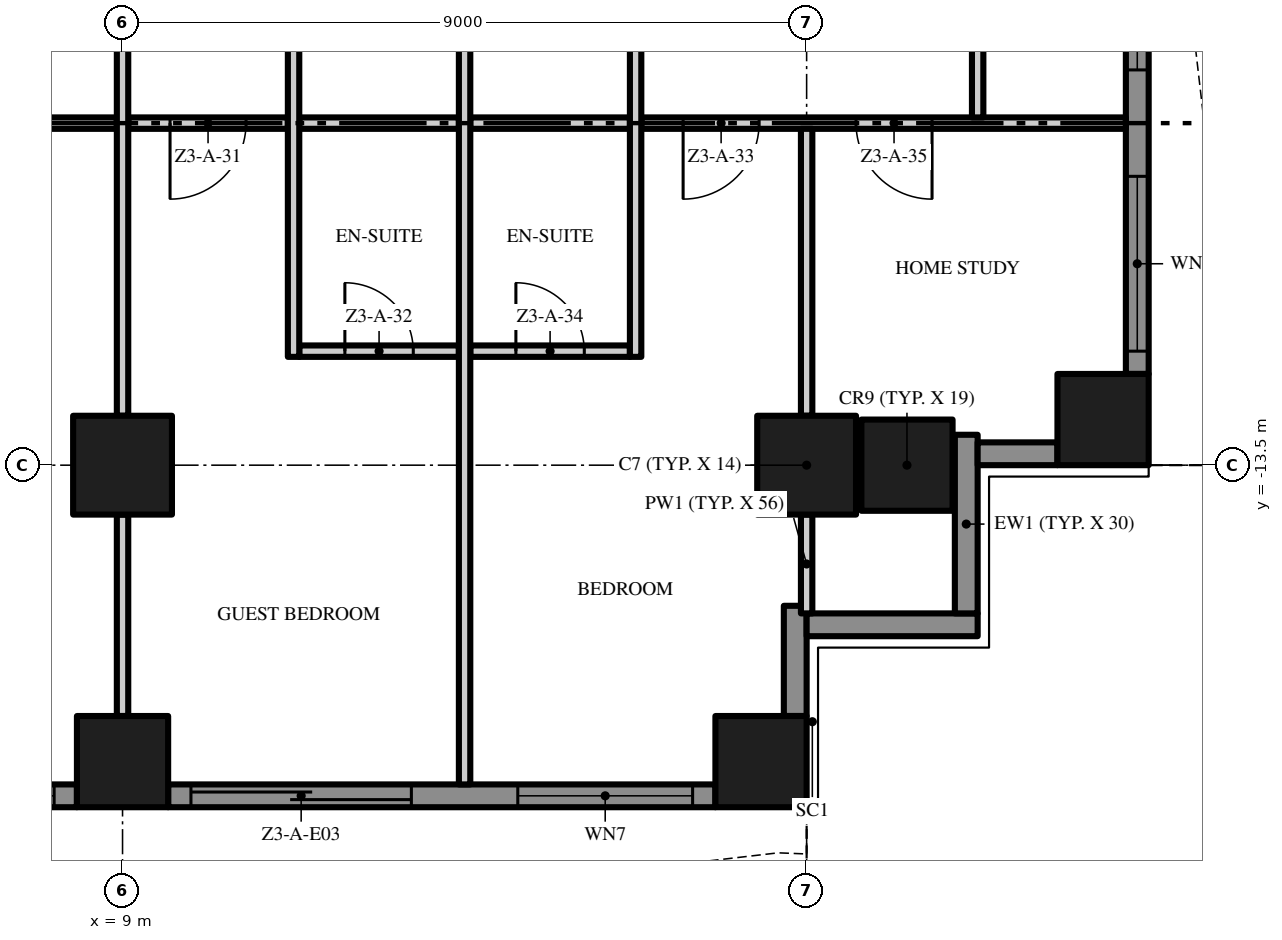
"""IFC4 building model, lengths in metres.
Left out: names, types, materials, properties, quantities, classifications, styles, units other than length and angle.
Written with IfcOpenShell. Run it as: python <this file> out.ifc"""

import sys

from ifc_helpers import new_model, si_unit, direction, frame, frame_2d, origin, origin_2d, place, context, subcontext, project, spatial, polyline, rectangle, outline, extrude, element, fill, save


model = new_model("IFC4")
c1 = context("Model", 3, precision=1e-05, world=origin(), true_north=direction((0.0, 1.0)))
c2 = subcontext(c1, "Body", "Model", "MODEL_VIEW")
j1 = project(units=[si_unit("LENGTHUNIT", "METRE"), si_unit("PLANEANGLEUNIT", "RADIAN")], contexts=[c1])
p1 = place(None, origin())
s1 = spatial("IfcSite", under=j1, at=p1, CompositionType="ELEMENT")
p2 = place(p1, origin())
s2 = spatial("IfcBuilding", under=s1, at=p2, CompositionType="ELEMENT")
p3 = place(p2, frame((0.0, 0.0, 125.0)))
s3 = spatial("IfcBuildingStorey", under=s2, at=p3, CompositionType="ELEMENT", Elevation=125.0)
p4 = place(p3, frame((18.0, -13.5, 0.0), z_axis=(0.0, 0.0, 1.0), x_axis=(1.0, 0.0, 0.0)))
e1 = element("IfcColumn", 1, at=p4, inside=s3, PredefinedType="COLUMN", context=c2, shape_type="SweptSolid", body=[
    extrude(rectangle(XDim=1.3, YDim=1.3, at=origin_2d()), origin(), (0.0, 0.0, 1.0), 3.5),
])
for number, where, z_axis, x_axis in (
    (2, (17.4, -17.4, 0.0), (0.0, 0.0, 1.0), (1.0, 0.0, 0.0)),
    (3, (21.9, -12.9, 0.0), (0.0, 0.0, 1.0), (1.0, 0.0, 0.0)),
    (4, (19.32, -13.5, 0.0), (0.0, 0.0, 1.0), (1.0, 0.0, 0.0)),
):
    element("IfcColumn", number, at=place(p3, frame(where, z_axis=z_axis, x_axis=x_axis)), inside=s3, PredefinedType="COLUMN", context=c2, shape_type="SweptSolid", body=[
        extrude(rectangle(XDim=1.2, YDim=1.2, at=origin_2d()), origin(), (0.0, 0.0, 1.0), 3.5),
    ])
p5 = place(p3, frame((9.0, -13.5, 0.0), z_axis=(0.0, 0.0, 1.0), x_axis=(1.0, 0.0, 0.0)))
e5 = element("IfcColumn", 5, at=p5, inside=s3, PredefinedType="COLUMN", context=c2, shape_type="SweptSolid", body=[
    extrude(rectangle(XDim=1.3, YDim=1.3, at=origin_2d()), origin(), (0.0, 0.0, 1.0), 3.5),
])
p6 = place(p3, frame((9.0, -17.4, 0.0), z_axis=(0.0, 0.0, 1.0), x_axis=(1.0, 0.0, 0.0)))
e6 = element("IfcColumn", 6, at=p6, inside=s3, PredefinedType="COLUMN", context=c2, shape_type="SweptSolid", body=[
    extrude(rectangle(XDim=1.2, YDim=1.2, at=origin_2d()), origin(), (0.0, 0.0, 1.0), 3.5),
])
p7 = place(p3, frame((8.4, -17.85, 0.0), z_axis=(0.0, 0.0, 1.0), x_axis=(-1.0, 0.0, 0.0)))
e7 = element("IfcWall", 7, at=p7, inside=s3, PredefinedType="SOLIDWALL", context=c2, shape_type="SweptSolid", body=[
    extrude(rectangle(XDim=7.8, YDim=0.3, at=frame_2d((3.9, 0.0))), origin(), (0.0, 0.0, 1.0), 3.5),
])
p8 = place(p7, frame((4.6, 0.0, 0.45)))
e8 = element("IfcOpeningElement", 8, at=p8, cuts=e7, PredefinedType="OPENING", context=c2, shape_type="SweptSolid", body=[
    extrude(rectangle(XDim=2.9, YDim=2.65, at=frame_2d((1.45, 1.325))), frame((0.0, 0.16, 0.0), z_axis=(0.0, -1.0, 0.0), x_axis=(1.0, 0.0, 0.0)), (0.0, 0.0, 1.0), 0.32),
])
p9 = place(p7, frame((0.3, 0.0, 0.45)))
e9 = element("IfcOpeningElement", 9, at=p9, cuts=e7, PredefinedType="OPENING", context=c2, shape_type="SweptSolid", body=[
    extrude(rectangle(XDim=2.9, YDim=2.65, at=frame_2d((1.45, 1.325))), frame((0.0, 0.16, 0.0), z_axis=(0.0, -1.0, 0.0), x_axis=(1.0, 0.0, 0.0)), (0.0, 0.0, 1.0), 0.32),
])
p10 = place(p3, frame((16.8, -17.85, 0.0), z_axis=(0.0, 0.0, 1.0), x_axis=(-1.0, 0.0, 0.0)))
e10 = element("IfcWall", 10, at=p10, inside=s3, PredefinedType="SOLIDWALL", context=c2, shape_type="SweptSolid", body=[
    extrude(rectangle(XDim=7.2, YDim=0.3, at=frame_2d((3.6, 0.0))), origin(), (0.0, 0.0, 1.0), 3.5),
])
p11 = place(p10, frame((4.0, 0.0, 0.0)))
e11 = element("IfcOpeningElement", 11, at=p11, cuts=e10, PredefinedType="OPENING", context=c2, shape_type="SweptSolid", body=[
    extrude(rectangle(XDim=2.9, YDim=2.4, at=frame_2d((1.45, 1.2))), frame((0.0, 0.16, 0.0), z_axis=(0.0, -1.0, 0.0), x_axis=(1.0, 0.0, 0.0)), (0.0, 0.0, 1.0), 0.32),
])
p12 = place(p10, frame((0.3, 0.0, 0.45)))
e12 = element("IfcOpeningElement", 12, at=p12, cuts=e10, PredefinedType="OPENING", context=c2, shape_type="SweptSolid", body=[
    extrude(rectangle(XDim=2.3, YDim=2.65, at=frame_2d((1.15, 1.325))), frame((0.0, 0.16, 0.0), z_axis=(0.0, -1.0, 0.0), x_axis=(1.0, 0.0, 0.0)), (0.0, 0.0, 1.0), 0.32),
])
p13 = place(p3, frame((17.85, -15.35, 0.0), z_axis=(0.0, 0.0, 1.0), x_axis=(0.0, -1.0, 0.0)))
e13 = element("IfcWall", 13, at=p13, inside=s3, PredefinedType="SOLIDWALL", context=c2, shape_type="SweptSolid", body=[
    extrude(rectangle(XDim=1.45, YDim=0.3, at=frame_2d((0.725, 0.0))), origin(), (0.0, 0.0, 1.0), 3.5),
])
p14 = place(p3, frame((20.25, -15.6, 0.0), z_axis=(0.0, 0.0, 1.0), x_axis=(-1.0, 0.0, 0.0)))
e14 = element("IfcWall", 14, at=p14, inside=s3, PredefinedType="SOLIDWALL", context=c2, shape_type="SweptSolid", body=[
    extrude(rectangle(XDim=2.25, YDim=0.3, at=frame_2d((1.125, 0.0))), origin(), (0.0, 0.0, 1.0), 3.5),
])
p15 = place(p3, frame((20.1, -13.1, 0.0), z_axis=(0.0, 0.0, 1.0), x_axis=(0.0, -1.0, 0.0)))
e15 = element("IfcWall", 15, at=p15, inside=s3, PredefinedType="SOLIDWALL", context=c2, shape_type="SweptSolid", body=[
    extrude(rectangle(XDim=2.35, YDim=0.3, at=frame_2d((1.175, 0.0))), origin(), (0.0, 0.0, 1.0), 3.5),
])
p16 = place(p3, frame((21.3, -13.35, 0.0), z_axis=(0.0, 0.0, 1.0), x_axis=(-1.0, 0.0, 0.0)))
e16 = element("IfcWall", 16, at=p16, inside=s3, PredefinedType="SOLIDWALL", context=c2, shape_type="SweptSolid", body=[
    extrude(rectangle(XDim=1.05, YDim=0.3, at=frame_2d((0.525, 0.0))), origin(), (0.0, 0.0, 1.0), 3.5),
])
p17 = place(p3, frame((22.35, -5.1, 0.0), z_axis=(0.0, 0.0, 1.0), x_axis=(0.0, -1.0, 0.0)))
e17 = element("IfcWall", 17, at=p17, inside=s3, PredefinedType="SOLIDWALL", context=c2, shape_type="SweptSolid", body=[
    extrude(rectangle(XDim=7.2, YDim=0.3, at=frame_2d((3.6, 0.0))), origin(), (0.0, 0.0, 1.0), 3.5),
])
p18 = place(p17, frame((4.6, 0.0, 0.45)))
e18 = element("IfcOpeningElement", 18, at=p18, cuts=e17, PredefinedType="OPENING", context=c2, shape_type="SweptSolid", body=[
    extrude(rectangle(XDim=2.3, YDim=2.65, at=frame_2d((1.15, 1.325))), frame((0.0, 0.16, 0.0), z_axis=(0.0, -1.0, 0.0), x_axis=(1.0, 0.0, 0.0)), (0.0, 0.0, 1.0), 0.32),
])
p19 = place(p17, frame((0.3, 0.0, 0.45)))
e19 = element("IfcOpeningElement", 19, at=p19, cuts=e17, PredefinedType="OPENING", context=c2, shape_type="SweptSolid", body=[
    extrude(rectangle(XDim=2.9, YDim=2.65, at=frame_2d((1.45, 1.325))), frame((0.0, 0.16, 0.0), z_axis=(0.0, -1.0, 0.0), x_axis=(1.0, 0.0, 0.0)), (0.0, 0.0, 1.0), 0.32),
])
p20 = place(p3, origin())
e20 = element("IfcWall", 20, at=p20, inside=s3, PredefinedType="USERDEFINED", context=c2, shape_type="SweptSolid", body=[
    extrude(outline(polyline([(-18.0, -20.649), (-16.5, -19.988), (-15.0, -19.255), (-13.5, -18.731), (-12.375, -18.6), (-12.0, -18.615), (-10.5, -18.951), (-9.0, -19.612), (-7.5, -20.345), (-6.0, -20.869), (-4.875, -21.0), (-4.5, -20.985), (-3.0, -20.649), (-1.5, -19.988), (0.0, -19.255), (1.5, -18.731), (2.625, -18.6), (3.0, -18.615), (4.5, -18.951), (6.0, -19.612), (7.5, -20.345), (9.0, -20.869), (10.125, -21.0), (10.5, -20.985), (12.0, -20.649), (13.5, -19.988), (15.0, -19.255), (16.5, -18.731), (17.625, -18.6), (18.0, -18.615), (18.01, -18.365), (17.615, -18.349), (16.444, -18.486), (14.904, -19.024), (13.395, -19.761), (11.921, -20.41), (10.467, -20.736), (10.135, -20.749), (9.056, -20.624), (7.596, -20.114), (6.105, -19.385), (4.579, -18.713), (3.033, -18.366), (2.615, -18.349), (1.444, -18.486), (-0.096, -19.024), (-1.605, -19.761), (-3.079, -20.41), (-4.533, -20.736), (-4.865, -20.749), (-5.944, -20.624), (-7.404, -20.114), (-8.895, -19.385), (-10.421, -18.713), (-11.967, -18.366), (-12.385, -18.349), (-13.556, -18.486), (-15.096, -19.024), (-16.605, -19.761), (-18.101, -20.42), (-18.0, -20.649)])), origin(), (0.0, 0.0, 1.0), 0.9),
])
p21 = place(p3, origin())
e21 = element("IfcWall", 21, at=p21, inside=s3, PredefinedType="USERDEFINED", context=c2, shape_type="SweptSolid", body=[
    extrude(outline(polyline([(25.149, -13.5), (24.488, -12.0), (23.755, -10.5), (23.231, -9.0), (23.1, -7.875), (23.115, -7.5), (23.451, -6.0), (24.112, -4.5), (24.845, -3.0), (25.369, -1.5), (25.5, -0.375), (25.485, 0.0), (25.149, 1.5), (24.488, 3.0), (23.755, 4.5), (23.231, 6.0), (23.1, 7.125), (23.115, 7.5), (23.451, 9.0), (24.112, 10.5), (24.845, 12.0), (25.369, 13.5), (25.5, 14.625), (25.485, 15.0), (25.149, 16.5), (24.488, 18.0), (24.259, 17.899), (24.91, 16.421), (25.236, 14.967), (25.249, 14.635), (25.124, 13.556), (24.614, 12.096), (23.885, 10.605), (23.213, 9.079), (22.866, 7.533), (22.849, 7.115), (22.986, 5.944), (23.524, 4.404), (24.261, 2.895), (24.91, 1.421), (25.236, -0.033), (25.249, -0.365), (25.124, -1.444), (24.614, -2.904), (23.885, -4.395), (23.213, -5.921), (22.866, -7.467), (22.849, -7.885), (22.986, -9.056), (23.524, -10.596), (24.261, -12.105), (24.92, -13.601), (25.149, -13.5)])), origin(), (0.0, 0.0, 1.0), 0.9),
])
p22 = place(p3, frame((11.325, -12.0, 0.0), z_axis=(0.0, 0.0, 1.0), x_axis=(1.0, 0.0, 0.0)))
e22 = element("IfcWall", 22, at=p22, inside=s3, PredefinedType="PARTITIONING", context=c2, shape_type="SweptSolid", body=[
    extrude(rectangle(XDim=2.1, YDim=0.15, at=frame_2d((1.05, 0.0))), origin(), (0.0, 0.0, 1.0), 3.5),
])
p23 = place(p22, frame((0.6, 0.0, 0.0)))
e23 = element("IfcOpeningElement", 23, at=p23, cuts=e22, PredefinedType="OPENING", context=c2, shape_type="SweptSolid", body=[
    extrude(rectangle(XDim=0.9, YDim=2.1, at=frame_2d((0.45, 1.05))), frame((0.0, 0.085, 0.0), z_axis=(0.0, -1.0, 0.0), x_axis=(1.0, 0.0, 0.0)), (0.0, 0.0, 1.0), 0.17),
])
p24 = place(p3, frame((13.575, -12.0, 0.0), z_axis=(0.0, 0.0, 1.0), x_axis=(1.0, 0.0, 0.0)))
e24 = element("IfcWall", 24, at=p24, inside=s3, PredefinedType="PARTITIONING", context=c2, shape_type="SweptSolid", body=[
    extrude(rectangle(XDim=2.1, YDim=0.15, at=frame_2d((1.05, 0.0))), origin(), (0.0, 0.0, 1.0), 3.5),
])
p25 = place(p24, frame((0.6, 0.0, 0.0)))
e25 = element("IfcOpeningElement", 25, at=p25, cuts=e24, PredefinedType="OPENING", context=c2, shape_type="SweptSolid", body=[
    extrude(rectangle(XDim=0.9, YDim=2.1, at=frame_2d((0.45, 1.05))), frame((0.0, 0.085, 0.0), z_axis=(0.0, -1.0, 0.0), x_axis=(1.0, 0.0, 0.0)), (0.0, 0.0, 1.0), 0.17),
])
p26 = place(p3, frame((8.925, -9.0, 0.0), z_axis=(0.0, 0.0, 1.0), x_axis=(-1.0, 0.0, 0.0)))
e26 = element("IfcWall", 26, at=p26, inside=s3, PredefinedType="PARTITIONING", context=c2, shape_type="SweptSolid", body=[
    extrude(rectangle(XDim=8.85, YDim=0.15, at=frame_2d((4.425, 0.0))), origin(), (0.0, 0.0, 1.0), 3.5),
])
p27 = place(p26, frame((6.3, 0.0, 0.0)))
e27 = element("IfcOpeningElement", 27, at=p27, cuts=e26, PredefinedType="OPENING", context=c2, shape_type="SweptSolid", body=[
    extrude(rectangle(XDim=1.5, YDim=2.4, at=frame_2d((0.75, 1.2))), frame((0.0, 0.085, 0.0), z_axis=(0.0, -1.0, 0.0), x_axis=(1.0, 0.0, 0.0)), (0.0, 0.0, 1.0), 0.17),
])
p28 = place(p3, frame((11.175, -9.0, 0.0), z_axis=(0.0, 0.0, 1.0), x_axis=(-1.0, 0.0, 0.0)))
e28 = element("IfcWall", 28, at=p28, inside=s3, PredefinedType="PARTITIONING", context=c2, shape_type="SweptSolid", body=[
    extrude(rectangle(XDim=2.1, YDim=0.15, at=frame_2d((1.05, 0.0))), origin(), (0.0, 0.0, 1.0), 3.5),
])
p29 = place(p28, frame((0.55, 0.0, 0.0)))
e29 = element("IfcOpeningElement", 29, at=p29, cuts=e28, PredefinedType="OPENING", context=c2, shape_type="SweptSolid", body=[
    extrude(rectangle(XDim=1.0, YDim=2.4, at=frame_2d((0.5, 1.2))), frame((0.0, 0.085, 0.0), z_axis=(0.0, -1.0, 0.0), x_axis=(1.0, 0.0, 0.0)), (0.0, 0.0, 1.0), 0.17),
])
for number, where, z_axis, x_axis in (
    (30, (11.325, -9.0, 0.0), (0.0, 0.0, 1.0), (1.0, 0.0, 0.0)),
    (31, (13.575, -9.0, 0.0), (0.0, 0.0, 1.0), (1.0, 0.0, 0.0)),
):
    element("IfcWall", number, at=place(p3, frame(where, z_axis=z_axis, x_axis=x_axis)), inside=s3, PredefinedType="PARTITIONING", context=c2, shape_type="SweptSolid", body=[
        extrude(rectangle(XDim=2.1, YDim=0.15, at=frame_2d((1.05, 0.0))), origin(), (0.0, 0.0, 1.0), 3.5),
    ])
p30 = place(p3, frame((22.2, -9.0, 0.0), z_axis=(0.0, 0.0, 1.0), x_axis=(-1.0, 0.0, 0.0)))
e32 = element("IfcWall", 32, at=p30, inside=s3, PredefinedType="PARTITIONING", context=c2, shape_type="SweptSolid", body=[
    extrude(rectangle(XDim=6.375, YDim=0.15, at=frame_2d((3.188, 0.0))), origin(), (0.0, 0.0, 1.0), 3.5),
])
p31 = place(p30, frame((4.825, 0.0, 0.0)))
e33 = element("IfcOpeningElement", 33, at=p31, cuts=e32, PredefinedType="OPENING", context=c2, shape_type="SweptSolid", body=[
    extrude(rectangle(XDim=1.0, YDim=2.4, at=frame_2d((0.5, 1.2))), frame((0.0, 0.085, 0.0), z_axis=(0.0, -1.0, 0.0), x_axis=(1.0, 0.0, 0.0)), (0.0, 0.0, 1.0), 0.17),
])
p32 = place(p30, frame((2.55, 0.0, 0.0)))
e34 = element("IfcOpeningElement", 34, at=p32, cuts=e32, PredefinedType="OPENING", context=c2, shape_type="SweptSolid", body=[
    extrude(rectangle(XDim=1.0, YDim=2.4, at=frame_2d((0.5, 1.2))), frame((0.0, 0.085, 0.0), z_axis=(0.0, -1.0, 0.0), x_axis=(1.0, 0.0, 0.0)), (0.0, 0.0, 1.0), 0.17),
])
p33 = place(p3, frame((9.0, -16.8, 0.0), z_axis=(0.0, 0.0, 1.0), x_axis=(0.0, 1.0, 0.0)))
e35 = element("IfcWall", 35, at=p33, inside=s3, PredefinedType="PARTITIONING", context=c2, shape_type="SweptSolid", body=[
    extrude(rectangle(XDim=2.65, YDim=0.15, at=frame_2d((1.325, 0.0))), origin(), (0.0, 0.0, 1.0), 3.5),
])
p34 = place(p3, frame((9.0, -12.85, 0.0), z_axis=(0.0, 0.0, 1.0), x_axis=(0.0, 1.0, 0.0)))
e36 = element("IfcWall", 36, at=p34, inside=s3, PredefinedType="PARTITIONING", context=c2, shape_type="SweptSolid", body=[
    extrude(rectangle(XDim=7.7, YDim=0.15, at=frame_2d((3.85, 0.0))), origin(), (0.0, 0.0, 1.0), 3.5),
])
p35 = place(p3, frame((11.25, -12.075, 0.0), z_axis=(0.0, 0.0, 1.0), x_axis=(0.0, 1.0, 0.0)))
e37 = element("IfcWall", 37, at=p35, inside=s3, PredefinedType="PARTITIONING", context=c2, shape_type="SweptSolid", body=[
    extrude(rectangle(XDim=7.65, YDim=0.15, at=frame_2d((3.825, 0.0))), origin(), (0.0, 0.0, 1.0), 3.5),
])
p36 = place(p3, frame((13.5, -17.7, 0.0), z_axis=(0.0, 0.0, 1.0), x_axis=(0.0, 1.0, 0.0)))
e38 = element("IfcWall", 38, at=p36, inside=s3, PredefinedType="PARTITIONING", context=c2, shape_type="SweptSolid", body=[
    extrude(rectangle(XDim=13.125, YDim=0.15, at=frame_2d((6.562, 0.0))), origin(), (0.0, 0.0, 1.0), 3.5),
])
p37 = place(p3, frame((15.75, -12.075, 0.0), z_axis=(0.0, 0.0, 1.0), x_axis=(0.0, 1.0, 0.0)))
e39 = element("IfcWall", 39, at=p37, inside=s3, PredefinedType="PARTITIONING", context=c2, shape_type="SweptSolid", body=[
    extrude(rectangle(XDim=7.65, YDim=0.15, at=frame_2d((3.825, 0.0))), origin(), (0.0, 0.0, 1.0), 3.5),
])
p38 = place(p3, frame((18.0, -15.45, 0.0), z_axis=(0.0, 0.0, 1.0), x_axis=(0.0, 1.0, 0.0)))
e40 = element("IfcWall", 40, at=p38, inside=s3, PredefinedType="PARTITIONING", context=c2, shape_type="SweptSolid", body=[
    extrude(rectangle(XDim=1.3, YDim=0.15, at=frame_2d((0.65, 0.0))), origin(), (0.0, 0.0, 1.0), 3.5),
])
p39 = place(p3, frame((18.0, -12.85, 0.0), z_axis=(0.0, 0.0, 1.0), x_axis=(0.0, 1.0, 0.0)))
e41 = element("IfcWall", 41, at=p39, inside=s3, PredefinedType="PARTITIONING", context=c2, shape_type="SweptSolid", body=[
    extrude(rectangle(XDim=3.775, YDim=0.15, at=frame_2d((1.887, 0.0))), origin(), (0.0, 0.0, 1.0), 3.5),
])
p40 = place(p3, frame((20.25, -4.425, 0.0), z_axis=(0.0, 0.0, 1.0), x_axis=(0.0, -1.0, 0.0)))
e42 = element("IfcWall", 42, at=p40, inside=s3, PredefinedType="PARTITIONING", context=c2, shape_type="SweptSolid", body=[
    extrude(rectangle(XDim=4.5, YDim=0.15, at=frame_2d((2.25, 0.0))), origin(), (0.0, 0.0, 1.0), 3.5),
])
p41 = place(p40, frame((1.95, 0.0, 0.0)))
e43 = element("IfcOpeningElement", 43, at=p41, cuts=e42, PredefinedType="OPENING", context=c2, shape_type="SweptSolid", body=[
    extrude(rectangle(XDim=0.8, YDim=2.0, at=frame_2d((0.4, 1.0))), frame((0.0, 0.085, 0.0), z_axis=(0.0, -1.0, 0.0), x_axis=(1.0, 0.0, 0.0)), (0.0, 0.0, 1.0), 0.17),
])
p42 = place(p9, origin())
e44 = element("IfcWindow", 44, at=p42, inside=s3, PartitioningType="SINGLE_PANEL", PredefinedType="WINDOW", context=c2, shape_type="SweptSolid", body=[
    extrude(rectangle(XDim=2.9, YDim=2.65, at=frame_2d((1.45, 1.325))), frame((0.0, 0.03, 0.0), z_axis=(0.0, -1.0, 0.0), x_axis=(1.0, 0.0, 0.0)), (0.0, 0.0, 1.0), 0.06),
])
fill(e9, e44)
p43 = place(p11, origin())
e45 = element("IfcDoor", 45, at=p43, inside=s3, OperationType="SINGLE_SWING_LEFT", PredefinedType="DOOR", context=c2, shape_type="SweptSolid", body=[
    extrude(rectangle(XDim=2.9, YDim=2.4, at=frame_2d((1.45, 1.2))), frame((0.0, 0.025, 0.0), z_axis=(0.0, -1.0, 0.0), x_axis=(1.0, 0.0, 0.0)), (0.0, 0.0, 1.0), 0.05),
])
fill(e11, e45)
p44 = place(p12, origin())
e46 = element("IfcWindow", 46, at=p44, inside=s3, PartitioningType="SINGLE_PANEL", PredefinedType="WINDOW", context=c2, shape_type="SweptSolid", body=[
    extrude(rectangle(XDim=2.3, YDim=2.65, at=frame_2d((1.15, 1.325))), frame((0.0, 0.03, 0.0), z_axis=(0.0, -1.0, 0.0), x_axis=(1.0, 0.0, 0.0)), (0.0, 0.0, 1.0), 0.06),
])
fill(e12, e46)
p45 = place(p18, origin())
e47 = element("IfcWindow", 47, at=p45, inside=s3, PartitioningType="SINGLE_PANEL", PredefinedType="WINDOW", context=c2, shape_type="SweptSolid", body=[
    extrude(rectangle(XDim=2.3, YDim=2.65, at=frame_2d((1.15, 1.325))), frame((0.0, 0.03, 0.0), z_axis=(0.0, -1.0, 0.0), x_axis=(1.0, 0.0, 0.0)), (0.0, 0.0, 1.0), 0.06),
])
fill(e18, e47)
p46 = place(p19, origin())
e48 = element("IfcWindow", 48, at=p46, inside=s3, PartitioningType="SINGLE_PANEL", PredefinedType="WINDOW", context=c2, shape_type="SweptSolid", body=[
    extrude(rectangle(XDim=2.9, YDim=2.65, at=frame_2d((1.45, 1.325))), frame((0.0, 0.03, 0.0), z_axis=(0.0, -1.0, 0.0), x_axis=(1.0, 0.0, 0.0)), (0.0, 0.0, 1.0), 0.06),
])
fill(e19, e48)
p47 = place(p29, origin())
e49 = element("IfcDoor", 49, at=p47, inside=s3, OperationType="SINGLE_SWING_RIGHT", PredefinedType="DOOR", context=c2, shape_type="SweptSolid", body=[
    extrude(rectangle(XDim=1.0, YDim=2.4, at=frame_2d((0.5, 1.2))), frame((0.0, 0.025, 0.0), z_axis=(0.0, -1.0, 0.0), x_axis=(1.0, 0.0, 0.0)), (0.0, 0.0, 1.0), 0.05),
])
fill(e29, e49)
p48 = place(p23, origin())
e50 = element("IfcDoor", 50, at=p48, inside=s3, OperationType="SINGLE_SWING_LEFT", PredefinedType="DOOR", context=c2, shape_type="SweptSolid", body=[
    extrude(rectangle(XDim=0.9, YDim=2.1, at=frame_2d((0.45, 1.05))), frame((0.0, 0.025, 0.0), z_axis=(0.0, -1.0, 0.0), x_axis=(1.0, 0.0, 0.0)), (0.0, 0.0, 1.0), 0.05),
])
fill(e23, e50)
p49 = place(p31, origin())
e51 = element("IfcDoor", 51, at=p49, inside=s3, OperationType="SINGLE_SWING_RIGHT", PredefinedType="DOOR", context=c2, shape_type="SweptSolid", body=[
    extrude(rectangle(XDim=1.0, YDim=2.4, at=frame_2d((0.5, 1.2))), frame((0.0, 0.025, 0.0), z_axis=(0.0, -1.0, 0.0), x_axis=(1.0, 0.0, 0.0)), (0.0, 0.0, 1.0), 0.05),
])
fill(e33, e51)
p50 = place(p25, origin())
e52 = element("IfcDoor", 52, at=p50, inside=s3, OperationType="SINGLE_SWING_LEFT", PredefinedType="DOOR", context=c2, shape_type="SweptSolid", body=[
    extrude(rectangle(XDim=0.9, YDim=2.1, at=frame_2d((0.45, 1.05))), frame((0.0, 0.025, 0.0), z_axis=(0.0, -1.0, 0.0), x_axis=(1.0, 0.0, 0.0)), (0.0, 0.0, 1.0), 0.05),
])
fill(e25, e52)
p51 = place(p32, origin())
e53 = element("IfcDoor", 53, at=p51, inside=s3, OperationType="SINGLE_SWING_LEFT", PredefinedType="DOOR", context=c2, shape_type="SweptSolid", body=[
    extrude(rectangle(XDim=1.0, YDim=2.4, at=frame_2d((0.5, 1.2))), frame((0.0, 0.025, 0.0), z_axis=(0.0, -1.0, 0.0), x_axis=(1.0, 0.0, 0.0)), (0.0, 0.0, 1.0), 0.05),
])
fill(e34, e53)
save(model, sys.argv[1])
